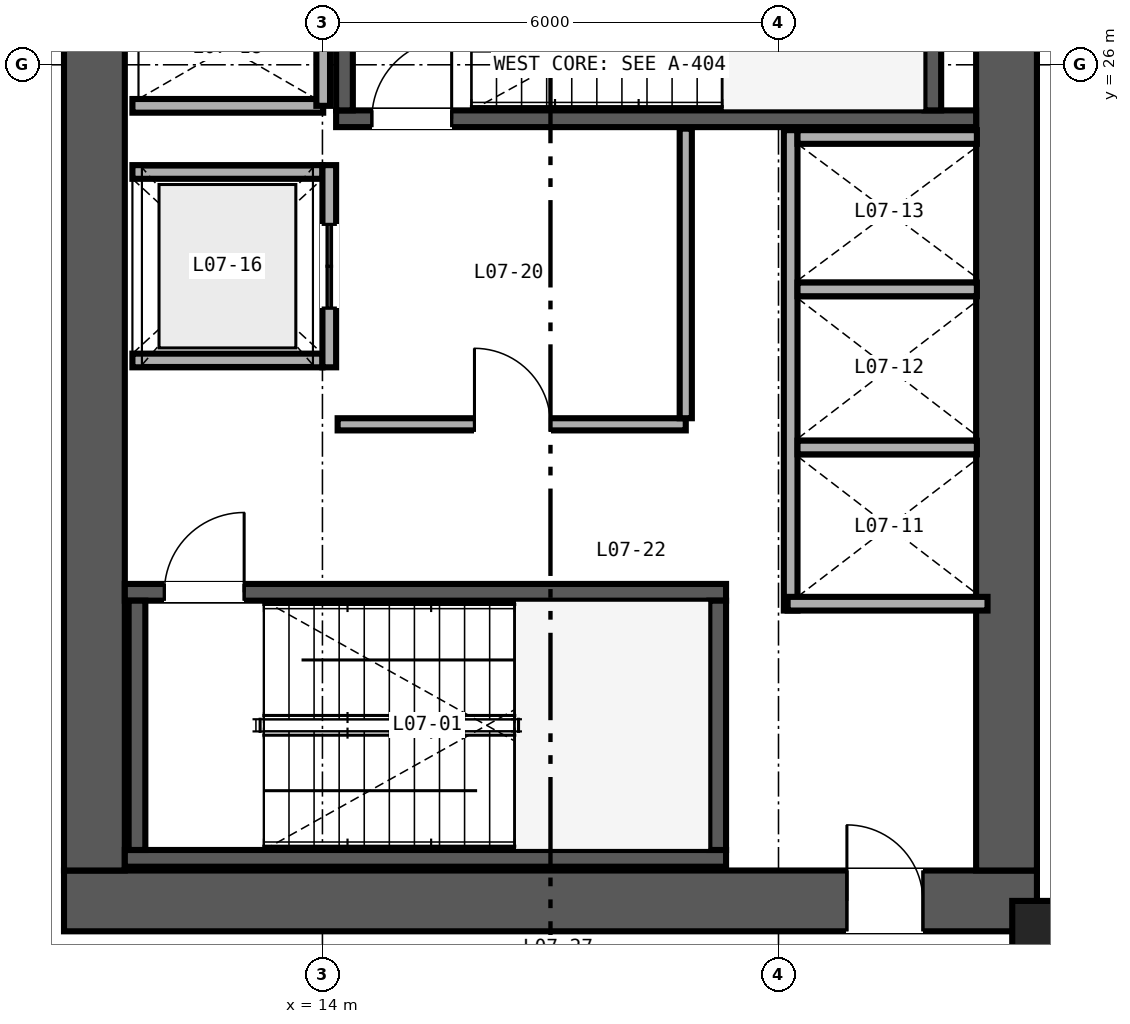
"""IFC4 building model, lengths in metres.
Left out: names, types, materials, properties, quantities, classifications, styles, units other than length and angle.
Written with IfcOpenShell. Run it as: python <this file> out.ifc"""

import sys

from ifc_helpers import new_model, si_unit, direction, frame, frame_2d, origin, origin_2d, place, context, subcontext, project, spatial, rectangle, hollow_rectangle, extrude, source, transform, mapped, element, fill, save


model = new_model("IFC4")
c1 = context("Model", 3, precision=1e-05, world=origin(), true_north=direction((0.0, 1.0)))
c2 = subcontext(c1, "Body", "Model", "MODEL_VIEW")
j1 = project(units=[si_unit("LENGTHUNIT", "METRE"), si_unit("PLANEANGLEUNIT", "RADIAN")], contexts=[c1])
p1 = place(None, origin())
s1 = spatial("IfcSite", under=j1, at=p1, CompositionType="ELEMENT")
p2 = place(p1, origin())
s2 = spatial("IfcBuilding", under=s1, at=p2, CompositionType="ELEMENT")
p3 = place(p2, frame((0.0, 0.0, 34.8)))
s3 = spatial("IfcBuildingStorey", under=s2, at=p3, CompositionType="ELEMENT", Elevation=34.8)
p4 = place(p3, frame((10.6, 15.0, 0.0), z_axis=(0.0, 0.0, 1.0), x_axis=(1.0, 0.0, 0.0)))
e1 = element("IfcWall", 1, at=p4, inside=s3, PredefinedType="SHEAR", context=c2, shape_type="SweptSolid", body=[
    extrude(rectangle(XDim=12.8, YDim=0.8, at=frame_2d((6.4, 0.0))), origin(), (0.0, 0.0, 1.0), 3.35),
])
p5 = place(p4, frame((10.3, 0.0, 0.0)))
e2 = element("IfcOpeningElement", 2, at=p5, cuts=e1, PredefinedType="OPENING", context=c2, shape_type="SweptSolid", body=[
    extrude(rectangle(XDim=1.0, YDim=2.15, at=frame_2d((0.5, 1.075))), frame((0.0, 0.41, 0.0), z_axis=(0.0, -1.0, 0.0), x_axis=(1.0, 0.0, 0.0)), (0.0, 0.0, 1.0), 0.82),
])
for number, where, z_axis, x_axis in (
    (3, (11.0, 15.4, 0.0), (0.0, 0.0, 1.0), (0.0, 1.0, 0.0)),
    (4, (23.0, 15.4, 0.0), (0.0, 0.0, 1.0), (0.0, 1.0, 0.0)),
):
    element("IfcWall", number, at=place(p3, frame(where, z_axis=z_axis, x_axis=x_axis)), inside=s3, PredefinedType="SHEAR", context=c2, shape_type="SweptSolid", body=[
        extrude(rectangle(XDim=21.2, YDim=0.8, at=frame_2d((10.6, 0.0))), origin(), (0.0, 0.0, 1.0), 3.35),
    ])
p6 = place(p3, frame((11.4, 15.56, 0.0), z_axis=(0.0, 0.0, 1.0), x_axis=(1.0, 0.0, 0.0)))
e5 = element("IfcWall", 5, at=p6, inside=s3, PredefinedType="SHEAR", context=c2, shape_type="SweptSolid", body=[
    extrude(rectangle(XDim=7.91, YDim=0.22, at=frame_2d((3.955, 0.0))), origin(), (0.0, 0.0, 1.0), 3.4),
])
p7 = place(p3, frame((11.4, 19.06, 0.0), z_axis=(0.0, 0.0, 1.0), x_axis=(1.0, 0.0, 0.0)))
e6 = element("IfcWall", 6, at=p7, inside=s3, PredefinedType="SHEAR", context=c2, shape_type="SweptSolid", body=[
    extrude(rectangle(XDim=7.91, YDim=0.22, at=frame_2d((3.955, 0.0))), origin(), (0.0, 0.0, 1.0), 3.4),
])
p8 = place(p7, frame((0.52, 0.0, 0.0)))
e7 = element("IfcOpeningElement", 7, at=p8, cuts=e6, PredefinedType="OPENING", context=c2, shape_type="SweptSolid", body=[
    extrude(rectangle(XDim=1.05, YDim=2.15, at=frame_2d((0.525, 1.075))), frame((0.0, 0.12, 0.0), z_axis=(0.0, -1.0, 0.0), x_axis=(1.0, 0.0, 0.0)), (0.0, 0.0, 1.0), 0.24),
])
for number, where, z_axis, x_axis in (
    (8, (11.56, 15.67, 0.0), (0.0, 0.0, 1.0), (0.0, 1.0, 0.0)),
    (9, (19.2, 15.67, 0.0), (0.0, 0.0, 1.0), (0.0, 1.0, 0.0)),
):
    element("IfcWall", number, at=place(p3, frame(where, z_axis=z_axis, x_axis=x_axis)), inside=s3, PredefinedType="SHEAR", context=c2, shape_type="SweptSolid", body=[
        extrude(rectangle(XDim=3.28, YDim=0.22, at=frame_2d((1.64, 0.0))), origin(), (0.0, 0.0, 1.0), 3.4),
    ])
p9 = place(p3, frame((14.18, 25.29, 0.0), z_axis=(0.0, 0.0, 1.0), x_axis=(1.0, 0.0, 0.0)))
e10 = element("IfcWall", 10, at=p9, inside=s3, PredefinedType="SHEAR", context=c2, shape_type="SweptSolid", body=[
    extrude(rectangle(XDim=8.42, YDim=0.22, at=frame_2d((4.21, 0.0))), origin(), (0.0, 0.0, 1.0), 3.4),
])
p10 = place(p9, frame((0.47, 0.0, 0.0)))
e11 = element("IfcOpeningElement", 11, at=p10, cuts=e10, PredefinedType="OPENING", context=c2, shape_type="SweptSolid", body=[
    extrude(rectangle(XDim=1.05, YDim=2.15, at=frame_2d((0.525, 1.075))), frame((0.0, 0.12, 0.0), z_axis=(0.0, -1.0, 0.0), x_axis=(1.0, 0.0, 0.0)), (0.0, 0.0, 1.0), 0.24),
])
for number, where, z_axis, x_axis in (
    (12, (14.29, 25.4, 0.0), (0.0, 0.0, 1.0), (0.0, 1.0, 0.0)),
    (13, (22.03, 25.4, 0.0), (0.0, 0.0, 1.0), (0.0, 1.0, 0.0)),
):
    element("IfcWall", number, at=place(p3, frame(where, z_axis=z_axis, x_axis=x_axis)), inside=s3, PredefinedType="SHEAR", context=c2, shape_type="SweptSolid", body=[
        extrude(rectangle(XDim=3.28, YDim=0.22, at=frame_2d((1.64, 0.0))), origin(), (0.0, 0.0, 1.0), 3.4),
    ])
m1 = source(origin(), c2, "Body", "SweptSolid", [
    extrude(hollow_rectangle(XDim=0.85, YDim=0.9, WallThickness=0.04, at=origin_2d()), origin(), (0.0, 0.0, 1.0), 3.35),
])
p11 = place(p3, frame((23.5, 14.55, 0.0), z_axis=(0.0, 0.0, 1.0), x_axis=(1.0, 0.0, 0.0)))
e14 = element("IfcColumn", 14, at=p11, inside=s3, PredefinedType="COLUMN", context=c2, shape_type="MappedRepresentation", body=[
    mapped(m1, transform((0.0, 0.0, 0.0), scale=1.0)),
])
p12 = place(p3, frame((20.16, 18.82, 0.0), z_axis=(0.0, 0.0, 1.0), x_axis=(0.0, 1.0, 0.0)))
e15 = element("IfcWall", 15, at=p12, inside=s3, PredefinedType="SOLIDWALL", context=c2, shape_type="SweptSolid", body=[
    extrude(rectangle(XDim=6.32, YDim=0.18, at=frame_2d((3.16, 0.0))), origin(), (0.0, 0.0, 1.0), 2.36),
])
p13 = place(p3, frame((20.12, 18.91, 0.0), z_axis=(0.0, 0.0, 1.0), x_axis=(1.0, 0.0, 0.0)))
e16 = element("IfcWall", 16, at=p13, inside=s3, PredefinedType="SOLIDWALL", context=c2, shape_type="SweptSolid", body=[
    extrude(rectangle(XDim=2.63, YDim=0.18, at=frame_2d((1.315, 0.0))), origin(), (0.0, 0.0, 1.0), 3.35),
])
p14 = place(p3, frame((20.25, 25.05, 0.0), z_axis=(0.0, 0.0, 1.0), x_axis=(1.0, 0.0, 0.0)))
e17 = element("IfcWall", 17, at=p14, inside=s3, PredefinedType="SOLIDWALL", context=c2, shape_type="SweptSolid", body=[
    extrude(rectangle(XDim=2.36, YDim=0.18, at=frame_2d((1.18, 0.0))), origin(), (0.0, 0.0, 1.0), 3.35),
])
p15 = place(p3, frame((20.25, 20.965, 0.0), z_axis=(0.0, 0.0, 1.0), x_axis=(1.0, 0.0, 0.0)))
e18 = element("IfcWall", 18, at=p15, inside=s3, PredefinedType="SOLIDWALL", context=c2, shape_type="SweptSolid", body=[
    extrude(rectangle(XDim=2.36, YDim=0.18, at=frame_2d((1.18, 0.0))), origin(), (0.0, 0.0, 1.0), 2.36),
])
p16 = place(p3, frame((20.25, 23.045, 0.0), z_axis=(0.0, 0.0, 1.0), x_axis=(1.0, 0.0, 0.0)))
e19 = element("IfcWall", 19, at=p16, inside=s3, PredefinedType="SOLIDWALL", context=c2, shape_type="SweptSolid", body=[
    extrude(rectangle(XDim=2.36, YDim=0.18, at=frame_2d((1.18, 0.0))), origin(), (0.0, 0.0, 1.0), 3.35),
])
for number, where, z_axis, x_axis in (
    (20, (11.5, 22.11, 0.0), (0.0, 0.0, 1.0), (1.0, 0.0, 0.0)),
    (21, (11.5, 24.59, 0.0), (0.0, 0.0, 1.0), (1.0, 0.0, 0.0)),
):
    element("IfcWall", number, at=place(p3, frame(where, z_axis=z_axis, x_axis=x_axis)), inside=s3, PredefinedType="SOLIDWALL", context=c2, shape_type="SweptSolid", body=[
        extrude(rectangle(XDim=2.5, YDim=0.18, at=frame_2d((1.25, 0.0))), origin(), (0.0, 0.0, 1.0), 3.35),
    ])
p17 = place(p3, frame((14.09, 22.02, 0.0), z_axis=(0.0, 0.0, 1.0), x_axis=(0.0, 1.0, 0.0)))
e22 = element("IfcWall", 22, at=p17, inside=s3, PredefinedType="SOLIDWALL", context=c2, shape_type="SweptSolid", body=[
    extrude(rectangle(XDim=2.66, YDim=0.18, at=frame_2d((1.33, 0.0))), origin(), (0.0, 0.0, 1.0), 3.35),
])
p18 = place(p17, frame((0.78, 0.0, 0.0)))
e23 = element("IfcOpeningElement", 23, at=p18, cuts=e22, PredefinedType="OPENING", context=c2, shape_type="SweptSolid", body=[
    extrude(rectangle(XDim=1.1, YDim=2.2, at=frame_2d((0.55, 1.1))), frame((0.0, 0.1, 0.0), z_axis=(0.0, -1.0, 0.0), x_axis=(1.0, 0.0, 0.0)), (0.0, 0.0, 1.0), 0.2),
])
p19 = place(p3, frame((11.5, 25.46, 0.0), z_axis=(0.0, 0.0, 1.0), x_axis=(1.0, 0.0, 0.0)))
e24 = element("IfcWall", 24, at=p19, inside=s3, PredefinedType="SOLIDWALL", context=c2, shape_type="SweptSolid", body=[
    extrude(rectangle(XDim=2.51, YDim=0.18, at=frame_2d((1.255, 0.0))), origin(), (0.0, 0.0, 1.0), 3.35),
])
p20 = place(p3, frame((14.01, 25.46, 0.0), z_axis=(0.0, 0.0, 1.0), x_axis=(0.0, 1.0, 0.0)))
e25 = element("IfcWall", 25, at=p20, inside=s3, PredefinedType="SOLIDWALL", context=c2, shape_type="SweptSolid", body=[
    extrude(rectangle(XDim=3.08, YDim=0.18, at=frame_2d((1.54, 0.0))), origin(), (0.0, 0.0, 1.0), 3.35),
])
p21 = place(p3, frame((14.2, 21.27, 0.0), z_axis=(0.0, 0.0, 1.0), x_axis=(1.0, 0.0, 0.0)))
e26 = element("IfcWall", 26, at=p21, inside=s3, PredefinedType="PARTITIONING", context=c2, shape_type="SweptSolid", body=[
    extrude(rectangle(XDim=4.58, YDim=0.16, at=frame_2d((2.29, 0.0))), origin(), (0.0, 0.0, 1.0), 3.35),
])
p22 = place(p21, frame((1.8, 0.0, 0.0)))
e27 = element("IfcOpeningElement", 27, at=p22, cuts=e26, PredefinedType="OPENING", context=c2, shape_type="SweptSolid", body=[
    extrude(rectangle(XDim=1.0, YDim=2.15, at=frame_2d((0.5, 1.075))), frame((0.0, 0.09, 0.0), z_axis=(0.0, -1.0, 0.0), x_axis=(1.0, 0.0, 0.0)), (0.0, 0.0, 1.0), 0.18),
])
p23 = place(p3, frame((18.78, 21.35, 0.0), z_axis=(0.0, 0.0, 1.0), x_axis=(0.0, 1.0, 0.0)))
e28 = element("IfcWall", 28, at=p23, inside=s3, PredefinedType="PARTITIONING", context=c2, shape_type="SweptSolid", body=[
    extrude(rectangle(XDim=3.81, YDim=0.16, at=frame_2d((1.905, 0.0))), origin(), (0.0, 0.0, 1.0), 3.35),
])
m2 = source(origin(), c2, "Body", "SweptSolid", [
    extrude(rectangle(XDim=1.05, YDim=2.15, at=frame_2d((0.525, 1.075))), frame((0.0, 0.025, 0.0), z_axis=(0.0, -1.0, 0.0), x_axis=(1.0, 0.0, 0.0)), (0.0, 0.0, 1.0), 0.05),
])
p24 = place(p8, origin())
e29 = element("IfcDoor", 29, at=p24, inside=s3, OperationType="SINGLE_SWING_RIGHT", PredefinedType="DOOR", context=c2, shape_type="MappedRepresentation", body=[
    mapped(m2, transform((0.0, 0.0, 0.0), scale=1.0)),
])
fill(e7, e29)
p25 = place(p10, origin())
e30 = element("IfcDoor", 30, at=p25, inside=s3, OperationType="SINGLE_SWING_RIGHT", PredefinedType="DOOR", context=c2, shape_type="MappedRepresentation", body=[
    mapped(m2, transform((0.0, 0.0, 0.0), scale=1.0)),
])
fill(e11, e30)
m3 = source(origin(), c2, "Body", "SweptSolid", [
    extrude(rectangle(XDim=1.1, YDim=2.2, at=frame_2d((0.55, 1.1))), frame((0.0, 0.025, 0.0), z_axis=(0.0, -1.0, 0.0), x_axis=(1.0, 0.0, 0.0)), (0.0, 0.0, 1.0), 0.05),
])
p26 = place(p18, origin())
e31 = element("IfcDoor", 31, at=p26, inside=s3, OperationType="DOUBLE_DOOR_SLIDING", PredefinedType="DOOR", context=c2, shape_type="MappedRepresentation", body=[
    mapped(m3, transform((0.0, 0.0, 0.0), scale=1.0)),
])
fill(e23, e31)
m4 = source(origin(), c2, "Body", "SweptSolid", [
    extrude(rectangle(XDim=1.0, YDim=2.15, at=frame_2d((0.5, 1.075))), frame((0.0, 0.025, 0.0), z_axis=(0.0, -1.0, 0.0), x_axis=(1.0, 0.0, 0.0)), (0.0, 0.0, 1.0), 0.05),
])
p27 = place(p22, origin())
e32 = element("IfcDoor", 32, at=p27, inside=s3, OperationType="SINGLE_SWING_LEFT", PredefinedType="DOOR", context=c2, shape_type="MappedRepresentation", body=[
    mapped(m4, transform((0.0, 0.0, 0.0), scale=1.0)),
])
fill(e27, e32)
p28 = place(p5, origin())
e33 = element("IfcDoor", 33, at=p28, inside=s3, OperationType="SINGLE_SWING_LEFT", PredefinedType="DOOR", context=c2, shape_type="MappedRepresentation", body=[
    mapped(m4, transform((0.0, 0.0, 0.0), scale=1.0)),
])
fill(e2, e33)
save(model, sys.argv[1])
